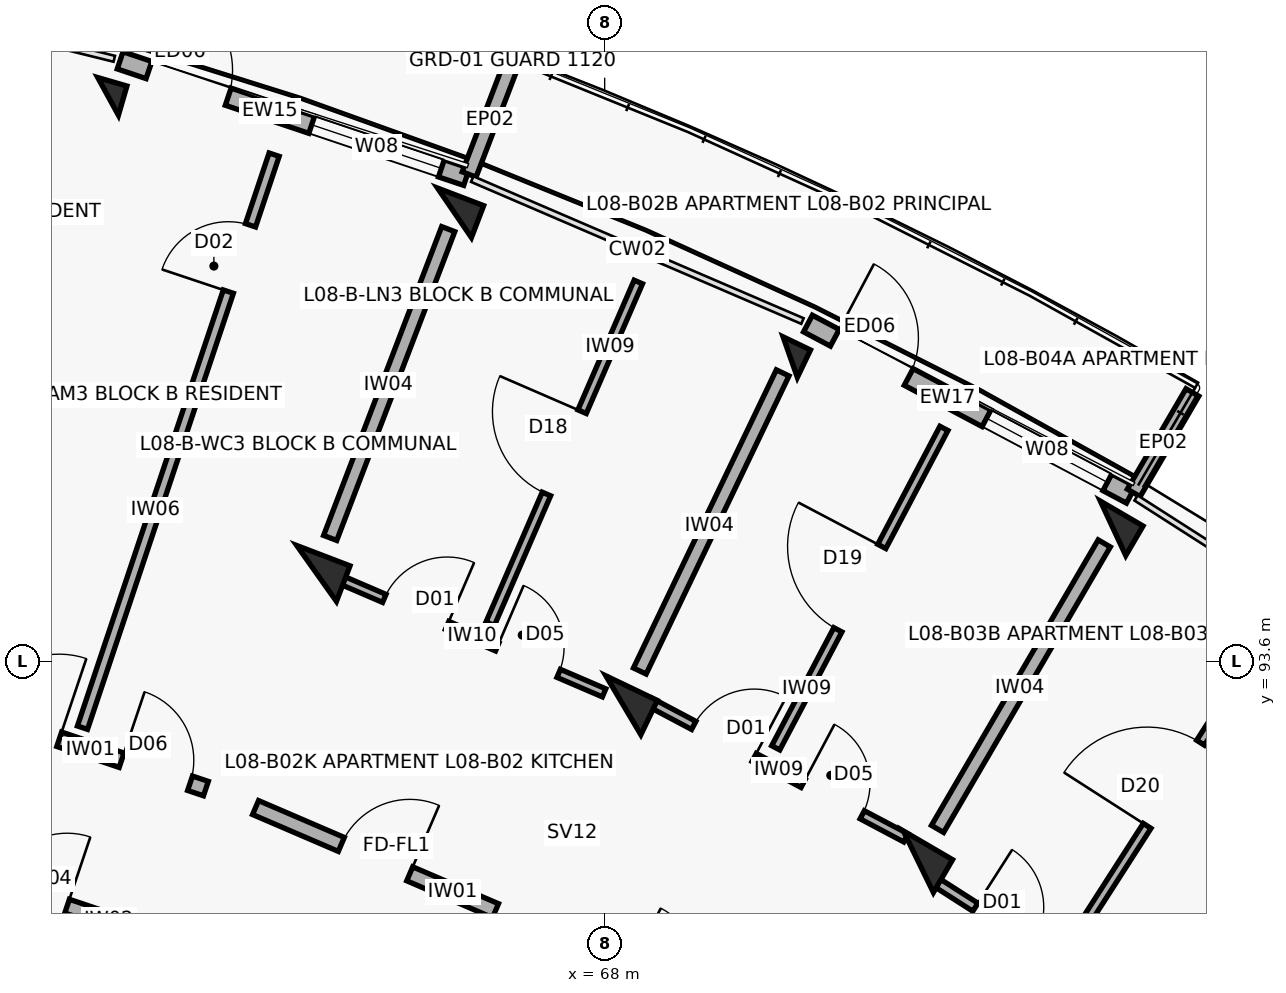
"""IFC4 building model, lengths in metres.
Left out: names, types, materials, properties, quantities, classifications, styles, units other than length and angle.
Written with IfcOpenShell. Run it as: python <this file> out.ifc"""

import sys

from ifc_helpers import new_model, si_unit, direction, frame, frame_2d, origin, origin_2d, place, context, subcontext, project, spatial, rectangle, extrude, element, fill, save


model = new_model("IFC4")
c1 = context("Model", 3, precision=1e-05, world=origin(), true_north=direction((0.0, 1.0)))
c2 = subcontext(c1, "Body", "Model", "MODEL_VIEW")
j1 = project(units=[si_unit("LENGTHUNIT", "METRE"), si_unit("PLANEANGLEUNIT", "RADIAN")], contexts=[c1])
p1 = place(None, origin())
s1 = spatial("IfcSite", under=j1, at=p1, CompositionType="ELEMENT")
p2 = place(p1, origin())
s2 = spatial("IfcBuilding", under=s1, at=p2, CompositionType="ELEMENT")
p3 = place(p2, frame((0.0, 0.0, 26.7)))
s3 = spatial("IfcBuildingStorey", under=s2, at=p3, CompositionType="ELEMENT", Elevation=26.7)
p4 = place(p3, frame((61.467, 101.031, 0.0), z_axis=(0.0, 0.0, 1.0), x_axis=(0.27966144946, 0.96009867914, 0.0)))
e1 = element("IfcColumn", 1, at=p4, inside=s3, PredefinedType="COLUMN", context=c2, shape_type="SweptSolid", body=[
    extrude(rectangle(XDim=0.4, YDim=0.4, at=origin_2d()), origin(), (0.0, 0.0, 1.0), 3.1),
])
p5 = place(p3, frame((64.21, 94.753, 0.0), z_axis=(0.0, 0.0, 1.0), x_axis=(0.357064076459, 0.934079892355, 0.0)))
e2 = element("IfcColumn", 2, at=p5, inside=s3, PredefinedType="COLUMN", context=c2, shape_type="SweptSolid", body=[
    extrude(rectangle(XDim=0.5, YDim=0.75, at=origin_2d()), origin(), (0.0, 0.0, 1.0), 3.1),
])
p6 = place(p3, frame((66.024, 99.499, 0.0), z_axis=(0.0, 0.0, 1.0), x_axis=(0.357064076459, 0.934079892355, 0.0)))
e3 = element("IfcColumn", 3, at=p6, inside=s3, PredefinedType="COLUMN", context=c2, shape_type="SweptSolid", body=[
    extrude(rectangle(XDim=0.45, YDim=0.65, at=origin_2d()), origin(), (0.0, 0.0, 1.0), 3.1),
])
p7 = place(p3, frame((68.246, 93.019, 0.0), z_axis=(0.0, 0.0, 1.0), x_axis=(0.432085748802, 0.901832526405, 0.0)))
e4 = element("IfcColumn", 4, at=p7, inside=s3, PredefinedType="COLUMN", context=c2, shape_type="SweptSolid", body=[
    extrude(rectangle(XDim=0.5, YDim=0.75, at=origin_2d()), origin(), (0.0, 0.0, 1.0), 3.1),
])
p8 = place(p3, frame((70.441, 97.6, 0.0), z_axis=(0.0, 0.0, 1.0), x_axis=(0.432085748802, 0.901832526405, 0.0)))
e5 = element("IfcColumn", 5, at=p8, inside=s3, PredefinedType="COLUMN", context=c2, shape_type="SweptSolid", body=[
    extrude(rectangle(XDim=0.4, YDim=0.4, at=origin_2d()), origin(), (0.0, 0.0, 1.0), 3.1),
])
p9 = place(p3, frame((72.127, 90.96, 0.0), z_axis=(0.0, 0.0, 1.0), x_axis=(0.504226211181, 0.863571611366, 0.0)))
e6 = element("IfcColumn", 6, at=p9, inside=s3, PredefinedType="COLUMN", context=c2, shape_type="SweptSolid", body=[
    extrude(rectangle(XDim=0.5, YDim=0.75, at=origin_2d()), origin(), (0.0, 0.0, 1.0), 3.1),
])
p10 = place(p3, frame((74.689, 95.347, 0.0), z_axis=(0.0, 0.0, 1.0), x_axis=(0.504226211181, 0.863571611366, 0.0)))
e7 = element("IfcColumn", 7, at=p10, inside=s3, PredefinedType="COLUMN", context=c2, shape_type="SweptSolid", body=[
    extrude(rectangle(XDim=0.45, YDim=0.65, at=origin_2d()), origin(), (0.0, 0.0, 1.0), 3.1),
])
p11 = place(p3, frame((61.625, 101.504, 0.0), z_axis=(0.0, 0.0, 1.0), x_axis=(0.947867898788, -0.318663531717, 0.0)))
e8 = element("IfcWall", 8, at=p11, inside=s3, PredefinedType="SOLIDWALL", context=c2, shape_type="SweptSolid", body=[
    extrude(rectangle(XDim=4.809, YDim=0.238, at=frame_2d((2.405, 0.0))), origin(), (0.0, 0.0, 1.0), 2.25),
])
p12 = place(p11, frame((0.4, 0.0, 0.0)))
e9 = element("IfcOpeningElement", 9, at=p12, cuts=e8, PredefinedType="OPENING", context=c2, shape_type="SweptSolid", body=[
    extrude(rectangle(XDim=1.1, YDim=2.15, at=frame_2d((0.55, 1.075))), frame((0.0, 0.129, 0.0), z_axis=(0.0, -1.0, 0.0), x_axis=(1.0, 0.0, 0.0)), (0.0, 0.0, 1.0), 0.258),
])
p13 = place(p11, frame((2.659, 0.0, 0.35)))
e10 = element("IfcOpeningElement", 10, at=p13, cuts=e8, PredefinedType="OPENING", context=c2, shape_type="SweptSolid", body=[
    extrude(rectangle(XDim=1.8, YDim=1.65, at=frame_2d((0.9, 0.825))), frame((0.0, 0.129, 0.0), z_axis=(0.0, -1.0, 0.0), x_axis=(1.0, 0.0, 0.0)), (0.0, 0.0, 1.0), 0.258),
])
p14 = place(p3, frame((66.217, 100.003, 0.0), z_axis=(0.0, 0.0, 1.0), x_axis=(0.356957296461, 0.934120703391, 0.0)))
e11 = element("IfcWall", 11, at=p14, inside=s3, PredefinedType="PARAPET", context=c2, shape_type="SweptSolid", body=[
    extrude(rectangle(XDim=1.53, YDim=0.195, at=frame_2d((0.765, 0.0))), origin(), (0.0, 0.0, 1.0), 2.25),
])
p15 = place(p3, frame((70.675, 98.042, 0.0), z_axis=(0.0, 0.0, 1.0), x_axis=(0.883448093208, -0.468529045639, 0.0)))
e12 = element("IfcWall", 12, at=p15, inside=s3, PredefinedType="SOLIDWALL", context=c2, shape_type="SweptSolid", body=[
    extrude(rectangle(XDim=4.809, YDim=0.248, at=frame_2d((2.405, 0.0))), origin(), (0.0, 0.0, 1.0), 2.25),
])
p16 = place(p15, frame((0.4, 0.0, 0.0)))
e13 = element("IfcOpeningElement", 13, at=p16, cuts=e12, PredefinedType="OPENING", context=c2, shape_type="SweptSolid", body=[
    extrude(rectangle(XDim=1.1, YDim=2.15, at=frame_2d((0.55, 1.075))), frame((0.0, 0.134, 0.0), z_axis=(0.0, -1.0, 0.0), x_axis=(1.0, 0.0, 0.0)), (0.0, 0.0, 1.0), 0.268),
])
p17 = place(p15, frame((2.659, 0.0, 0.35)))
e14 = element("IfcOpeningElement", 14, at=p17, cuts=e12, PredefinedType="OPENING", context=c2, shape_type="SweptSolid", body=[
    extrude(rectangle(XDim=1.8, YDim=1.65, at=frame_2d((0.9, 0.825))), frame((0.0, 0.134, 0.0), z_axis=(0.0, -1.0, 0.0), x_axis=(1.0, 0.0, 0.0)), (0.0, 0.0, 1.0), 0.268),
])
p18 = place(p3, frame((74.961, 95.813, 0.0), z_axis=(0.0, 0.0, 1.0), x_axis=(0.504228145431, 0.863570481985, 0.0)))
e15 = element("IfcWall", 15, at=p18, inside=s3, PredefinedType="PARAPET", context=c2, shape_type="SweptSolid", body=[
    extrude(rectangle(XDim=1.53, YDim=0.195, at=frame_2d((0.765, 0.0))), origin(), (0.0, 0.0, 1.0), 2.25),
])
p19 = place(p3, frame((59.497, 93.018, 0.0), z_axis=(0.0, 0.0, 1.0), x_axis=(0.947863007629, -0.318678080151, 0.0)))
e16 = element("IfcWall", 16, at=p19, inside=s3, PredefinedType="SOLIDWALL", context=c2, shape_type="SweptSolid", body=[
    extrude(rectangle(XDim=3.436, YDim=0.2, at=frame_2d((1.718, 0.0))), origin(), (0.0, 0.0, 1.0), 2.08),
])
p20 = place(p19, frame((0.28, 0.0, 0.0)))
e17 = element("IfcOpeningElement", 17, at=p20, cuts=e16, PredefinedType="OPENING", context=c2, shape_type="SweptSolid", body=[
    extrude(rectangle(XDim=1.12, YDim=2.15, at=frame_2d((0.56, 1.075))), frame((0.0, 0.11, 0.0), z_axis=(0.0, -1.0, 0.0), x_axis=(1.0, 0.0, 0.0)), (0.0, 0.0, 1.0), 0.22),
])
p21 = place(p19, frame((2.266, 0.0, 0.0)))
e18 = element("IfcOpeningElement", 18, at=p21, cuts=e16, PredefinedType="OPENING", context=c2, shape_type="SweptSolid", body=[
    extrude(rectangle(XDim=0.95, YDim=2.1, at=frame_2d((0.475, 1.05))), frame((0.0, 0.11, 0.0), z_axis=(0.0, -1.0, 0.0), x_axis=(1.0, 0.0, 0.0)), (0.0, 0.0, 1.0), 0.22),
])
p22 = place(p3, frame((58.923, 91.049, 0.0), z_axis=(0.0, 0.0, 1.0), x_axis=(0.94787351033, -0.318646839643, 0.0)))
e19 = element("IfcWall", 19, at=p22, inside=s3, PredefinedType="SOLIDWALL", context=c2, shape_type="SweptSolid", body=[
    extrude(rectangle(XDim=3.269, YDim=0.19, at=frame_2d((1.634, 0.0))), origin(), (0.0, 0.0, 1.0), 2.08),
])
p23 = place(p22, frame((1.154, 0.0, 0.0)))
e20 = element("IfcOpeningElement", 20, at=p23, cuts=e19, PredefinedType="OPENING", context=c2, shape_type="SweptSolid", body=[
    extrude(rectangle(XDim=0.96, YDim=2.1, at=frame_2d((0.48, 1.05))), frame((0.0, 0.105, 0.0), z_axis=(0.0, -1.0, 0.0), x_axis=(1.0, 0.0, 0.0)), (0.0, 0.0, 1.0), 0.21),
])
p24 = place(p3, frame((61.13, 92.724, 0.0), z_axis=(0.0, 0.0, 1.0), x_axis=(0.317204178278, 0.948357268798, 0.0)))
e21 = element("IfcWall", 21, at=p24, inside=s3, PredefinedType="PARTITIONING", context=c2, shape_type="SweptSolid", body=[
    extrude(rectangle(XDim=7.95, YDim=0.14, at=frame_2d((3.975, 0.0))), origin(), (0.0, 0.0, 1.0), 2.08),
])
p25 = place(p24, frame((6.05, 0.0, 0.0)))
e22 = element("IfcOpeningElement", 22, at=p25, cuts=e21, PredefinedType="OPENING", context=c2, shape_type="SweptSolid", body=[
    extrude(rectangle(XDim=0.92, YDim=2.1, at=frame_2d((0.46, 1.05))), frame((0.0, 0.08, 0.0), z_axis=(0.0, -1.0, 0.0), x_axis=(1.0, 0.0, 0.0)), (0.0, 0.0, 1.0), 0.16),
])
p26 = place(p3, frame((63.407, 91.673, 0.0), z_axis=(0.0, 0.0, 1.0), x_axis=(0.918718172399, -0.394913813008, 0.0)))
e23 = element("IfcWall", 23, at=p26, inside=s3, PredefinedType="SOLIDWALL", context=c2, shape_type="SweptSolid", body=[
    extrude(rectangle(XDim=3.436, YDim=0.2, at=frame_2d((1.718, 0.0))), origin(), (0.0, 0.0, 1.0), 2.08),
])
p27 = place(p26, frame((1.228, 0.0, 0.0)))
e24 = element("IfcOpeningElement", 24, at=p27, cuts=e23, PredefinedType="OPENING", context=c2, shape_type="SweptSolid", body=[
    extrude(rectangle(XDim=0.98, YDim=2.15, at=frame_2d((0.49, 1.075))), frame((0.0, 0.11, 0.0), z_axis=(0.0, -1.0, 0.0), x_axis=(1.0, 0.0, 0.0)), (0.0, 0.0, 1.0), 0.22),
])
p28 = place(p3, frame((64.503, 94.682, 0.0), z_axis=(0.0, 0.0, 1.0), x_axis=(0.918732171064, -0.394881245253, 0.0)))
e25 = element("IfcWall", 25, at=p28, inside=s3, PredefinedType="PARTITIONING", context=c2, shape_type="SweptSolid", body=[
    extrude(rectangle(XDim=3.797, YDim=0.115, at=frame_2d((1.899, 0.0))), origin(), (0.0, 0.0, 1.0), 2.08),
])
p29 = place(p28, frame((0.65, 0.0, 0.0)))
e26 = element("IfcOpeningElement", 26, at=p29, cuts=e25, PredefinedType="OPENING", context=c2, shape_type="SweptSolid", body=[
    extrude(rectangle(XDim=0.9, YDim=2.1, at=frame_2d((0.45, 1.05))), frame((0.0, 0.067, 0.0), z_axis=(0.0, -1.0, 0.0), x_axis=(1.0, 0.0, 0.0)), (0.0, 0.0, 1.0), 0.135),
])
p30 = place(p28, frame((2.267, 0.0, 0.0)))
e27 = element("IfcOpeningElement", 27, at=p30, cuts=e25, PredefinedType="OPENING", context=c2, shape_type="SweptSolid", body=[
    extrude(rectangle(XDim=0.88, YDim=2.1, at=frame_2d((0.44, 1.05))), frame((0.0, 0.067, 0.0), z_axis=(0.0, -1.0, 0.0), x_axis=(1.0, 0.0, 0.0)), (0.0, 0.0, 1.0), 0.135),
])
p31 = place(p3, frame((66.494, 94.092, 0.0), z_axis=(0.0, 0.0, 1.0), x_axis=(0.397698322092, 0.917516236698, 0.0)))
e28 = element("IfcWall", 28, at=p31, inside=s3, PredefinedType="PARTITIONING", context=c2, shape_type="SweptSolid", body=[
    extrude(rectangle(XDim=4.9, YDim=0.12, at=frame_2d((2.45, 0.0))), origin(), (0.0, 0.0, 1.0), 2.08),
])
p32 = place(p31, frame((1.86, 0.0, 0.0)))
e29 = element("IfcOpeningElement", 29, at=p32, cuts=e28, PredefinedType="OPENING", context=c2, shape_type="SweptSolid", body=[
    extrude(rectangle(XDim=1.18, YDim=2.1, at=frame_2d((0.59, 1.05))), frame((0.0, 0.07, 0.0), z_axis=(0.0, -1.0, 0.0), x_axis=(1.0, 0.0, 0.0)), (0.0, 0.0, 1.0), 0.14),
])
p33 = place(p3, frame((64.389, 95.22, 0.0), z_axis=(0.0, 0.0, 1.0), x_axis=(0.357064016205, 0.934079915388, 0.0)))
e30 = element("IfcWall", 30, at=p33, inside=s3, PredefinedType="SOLIDWALL", context=c2, shape_type="SweptSolid", body=[
    extrude(rectangle(XDim=4.35, YDim=0.185, at=frame_2d((2.175, 0.0))), origin(), (0.0, 0.0, 1.0), 2.08),
])
p34 = place(p3, frame((68.598, 93.058, 0.0), z_axis=(0.0, 0.0, 1.0), x_axis=(0.883441603894, -0.468541281543, 0.0)))
e31 = element("IfcWall", 31, at=p34, inside=s3, PredefinedType="PARTITIONING", context=c2, shape_type="SweptSolid", body=[
    extrude(rectangle(XDim=3.81, YDim=0.12, at=frame_2d((1.905, 0.0))), origin(), (0.0, 0.0, 1.0), 2.08),
])
p35 = place(p34, frame((0.65, 0.0, 0.0)))
e32 = element("IfcOpeningElement", 32, at=p35, cuts=e31, PredefinedType="OPENING", context=c2, shape_type="SweptSolid", body=[
    extrude(rectangle(XDim=0.9, YDim=2.1, at=frame_2d((0.45, 1.05))), frame((0.0, 0.07, 0.0), z_axis=(0.0, -1.0, 0.0), x_axis=(1.0, 0.0, 0.0)), (0.0, 0.0, 1.0), 0.14),
])
p36 = place(p34, frame((2.28, 0.0, 0.0)))
e33 = element("IfcOpeningElement", 33, at=p36, cuts=e31, PredefinedType="OPENING", context=c2, shape_type="SweptSolid", body=[
    extrude(rectangle(XDim=0.88, YDim=2.1, at=frame_2d((0.44, 1.05))), frame((0.0, 0.07, 0.0), z_axis=(0.0, -1.0, 0.0), x_axis=(1.0, 0.0, 0.0)), (0.0, 0.0, 1.0), 0.14),
])
p37 = place(p3, frame((70.251, 92.459, 0.0), z_axis=(0.0, 0.0, 1.0), x_axis=(0.465865054936, 0.884855779542, 0.0)))
e34 = element("IfcWall", 34, at=p37, inside=s3, PredefinedType="PARTITIONING", context=c2, shape_type="SweptSolid", body=[
    extrude(rectangle(XDim=4.75, YDim=0.12, at=frame_2d((2.375, 0.0))), origin(), (0.0, 0.0, 1.0), 2.08),
])
p38 = place(p37, frame((1.755, 0.0, 0.0)))
e35 = element("IfcOpeningElement", 35, at=p38, cuts=e34, PredefinedType="OPENING", context=c2, shape_type="SweptSolid", body=[
    extrude(rectangle(XDim=1.24, YDim=2.1, at=frame_2d((0.62, 1.05))), frame((0.0, 0.07, 0.0), z_axis=(0.0, -1.0, 0.0), x_axis=(1.0, 0.0, 0.0)), (0.0, 0.0, 1.0), 0.14),
])
p39 = place(p3, frame((68.462, 93.469, 0.0), z_axis=(0.0, 0.0, 1.0), x_axis=(0.432086898897, 0.901831975371, 0.0)))
e36 = element("IfcWall", 36, at=p39, inside=s3, PredefinedType="SOLIDWALL", context=c2, shape_type="SweptSolid", body=[
    extrude(rectangle(XDim=4.35, YDim=0.185, at=frame_2d((2.175, 0.0))), origin(), (0.0, 0.0, 1.0), 2.08),
])
p40 = place(p3, frame((72.33, 90.712, 0.0), z_axis=(0.0, 0.0, 1.0), x_axis=(0.842245628842, -0.539093962771, 0.0)))
e37 = element("IfcWall", 37, at=p40, inside=s3, PredefinedType="PARTITIONING", context=c2, shape_type="SweptSolid", body=[
    extrude(rectangle(XDim=3.785, YDim=0.125, at=frame_2d((1.893, 0.0))), origin(), (0.0, 0.0, 1.0), 2.08),
])
p41 = place(p40, frame((0.65, 0.0, 0.0)))
e38 = element("IfcOpeningElement", 38, at=p41, cuts=e37, PredefinedType="OPENING", context=c2, shape_type="SweptSolid", body=[
    extrude(rectangle(XDim=0.9, YDim=2.1, at=frame_2d((0.45, 1.05))), frame((0.0, 0.073, 0.0), z_axis=(0.0, -1.0, 0.0), x_axis=(1.0, 0.0, 0.0)), (0.0, 0.0, 1.0), 0.145),
])
p42 = place(p40, frame((2.255, 0.0, 0.0)))
e39 = element("IfcOpeningElement", 39, at=p42, cuts=e37, PredefinedType="OPENING", context=c2, shape_type="SweptSolid", body=[
    extrude(rectangle(XDim=0.88, YDim=2.1, at=frame_2d((0.44, 1.05))), frame((0.0, 0.073, 0.0), z_axis=(0.0, -1.0, 0.0), x_axis=(1.0, 0.0, 0.0)), (0.0, 0.0, 1.0), 0.145),
])
p43 = place(p3, frame((74.124, 89.854, 0.0), z_axis=(0.0, 0.0, 1.0), x_axis=(0.5403494769, 0.84144069477, 0.0)))
e40 = element("IfcWall", 40, at=p43, inside=s3, PredefinedType="PARTITIONING", context=c2, shape_type="SweptSolid", body=[
    extrude(rectangle(XDim=5.05, YDim=0.12, at=frame_2d((2.525, 0.0))), origin(), (0.0, 0.0, 1.0), 2.08),
])
p44 = place(p43, frame((1.875, 0.0, 0.0)))
e41 = element("IfcOpeningElement", 41, at=p44, cuts=e40, PredefinedType="OPENING", context=c2, shape_type="SweptSolid", body=[
    extrude(rectangle(XDim=1.3, YDim=2.1, at=frame_2d((0.65, 1.05))), frame((0.0, 0.07, 0.0), z_axis=(0.0, -1.0, 0.0), x_axis=(1.0, 0.0, 0.0)), (0.0, 0.0, 1.0), 0.14),
])
p45 = place(p3, frame((72.379, 91.392, 0.0), z_axis=(0.0, 0.0, 1.0), x_axis=(0.504216452091, 0.863577309475, 0.0)))
e42 = element("IfcWall", 42, at=p45, inside=s3, PredefinedType="SOLIDWALL", context=c2, shape_type="SweptSolid", body=[
    extrude(rectangle(XDim=4.35, YDim=0.185, at=frame_2d((2.175, 0.0))), origin(), (0.0, 0.0, 1.0), 2.08),
])
p46 = place(p12, origin())
e43 = element("IfcDoor", 43, at=p46, inside=s3, OperationType="SINGLE_SWING_LEFT", PredefinedType="DOOR", context=c2, shape_type="SweptSolid", body=[
    extrude(rectangle(XDim=1.1, YDim=2.15, at=frame_2d((0.55, 1.075))), frame((0.0, 0.025, 0.0), z_axis=(0.0, -1.0, 0.0), x_axis=(1.0, 0.0, 0.0)), (0.0, 0.0, 1.0), 0.05),
])
fill(e9, e43)
p47 = place(p13, origin())
e44 = element("IfcWindow", 44, at=p47, inside=s3, PartitioningType="TRIPLE_PANEL_VERTICAL", PredefinedType="WINDOW", context=c2, shape_type="SweptSolid", body=[
    extrude(rectangle(XDim=1.8, YDim=1.65, at=frame_2d((0.9, 0.825))), frame((0.0, 0.03, 0.0), z_axis=(0.0, -1.0, 0.0), x_axis=(1.0, 0.0, 0.0)), (0.0, 0.0, 1.0), 0.06),
])
fill(e10, e44)
p48 = place(p16, origin())
e45 = element("IfcDoor", 45, at=p48, inside=s3, OperationType="SINGLE_SWING_LEFT", PredefinedType="DOOR", context=c2, shape_type="SweptSolid", body=[
    extrude(rectangle(XDim=1.1, YDim=2.15, at=frame_2d((0.55, 1.075))), frame((0.0, 0.025, 0.0), z_axis=(0.0, -1.0, 0.0), x_axis=(1.0, 0.0, 0.0)), (0.0, 0.0, 1.0), 0.05),
])
fill(e13, e45)
p49 = place(p17, origin())
e46 = element("IfcWindow", 46, at=p49, inside=s3, PartitioningType="TRIPLE_PANEL_VERTICAL", PredefinedType="WINDOW", context=c2, shape_type="SweptSolid", body=[
    extrude(rectangle(XDim=1.8, YDim=1.65, at=frame_2d((0.9, 0.825))), frame((0.0, 0.03, 0.0), z_axis=(0.0, -1.0, 0.0), x_axis=(1.0, 0.0, 0.0)), (0.0, 0.0, 1.0), 0.06),
])
fill(e14, e46)
p50 = place(p20, origin())
e47 = element("IfcDoor", 47, at=p50, inside=s3, OperationType="SINGLE_SWING_RIGHT", PredefinedType="DOOR", context=c2, shape_type="SweptSolid", body=[
    extrude(rectangle(XDim=1.12, YDim=2.15, at=frame_2d((0.56, 1.075))), frame((0.0, 0.025, 0.0), z_axis=(0.0, -1.0, 0.0), x_axis=(1.0, 0.0, 0.0)), (0.0, 0.0, 1.0), 0.05),
])
fill(e17, e47)
p51 = place(p21, origin())
e48 = element("IfcDoor", 48, at=p51, inside=s3, OperationType="SINGLE_SWING_LEFT", PredefinedType="DOOR", context=c2, shape_type="SweptSolid", body=[
    extrude(rectangle(XDim=0.95, YDim=2.1, at=frame_2d((0.475, 1.05))), frame((0.0, 0.025, 0.0), z_axis=(0.0, -1.0, 0.0), x_axis=(1.0, 0.0, 0.0)), (0.0, 0.0, 1.0), 0.05),
])
fill(e18, e48)
p52 = place(p23, origin())
e49 = element("IfcDoor", 49, at=p52, inside=s3, OperationType="SINGLE_SWING_RIGHT", PredefinedType="DOOR", context=c2, shape_type="SweptSolid", body=[
    extrude(rectangle(XDim=0.96, YDim=2.1, at=frame_2d((0.48, 1.05))), frame((0.0, 0.025, 0.0), z_axis=(0.0, -1.0, 0.0), x_axis=(1.0, 0.0, 0.0)), (0.0, 0.0, 1.0), 0.05),
])
fill(e20, e49)
p53 = place(p25, origin())
e50 = element("IfcDoor", 50, at=p53, inside=s3, OperationType="SINGLE_SWING_LEFT", PredefinedType="DOOR", context=c2, shape_type="SweptSolid", body=[
    extrude(rectangle(XDim=0.92, YDim=2.1, at=frame_2d((0.46, 1.05))), frame((0.0, 0.025, 0.0), z_axis=(0.0, -1.0, 0.0), x_axis=(1.0, 0.0, 0.0)), (0.0, 0.0, 1.0), 0.05),
])
fill(e22, e50)
p54 = place(p27, origin())
e51 = element("IfcDoor", 51, at=p54, inside=s3, OperationType="SINGLE_SWING_RIGHT", PredefinedType="DOOR", context=c2, shape_type="SweptSolid", body=[
    extrude(rectangle(XDim=0.98, YDim=2.15, at=frame_2d((0.49, 1.075))), frame((0.0, 0.025, 0.0), z_axis=(0.0, -1.0, 0.0), x_axis=(1.0, 0.0, 0.0)), (0.0, 0.0, 1.0), 0.05),
])
fill(e24, e51)
p55 = place(p29, origin())
e52 = element("IfcDoor", 52, at=p55, inside=s3, OperationType="SINGLE_SWING_RIGHT", PredefinedType="DOOR", context=c2, shape_type="SweptSolid", body=[
    extrude(rectangle(XDim=0.9, YDim=2.1, at=frame_2d((0.45, 1.05))), frame((0.0, 0.025, 0.0), z_axis=(0.0, -1.0, 0.0), x_axis=(1.0, 0.0, 0.0)), (0.0, 0.0, 1.0), 0.05),
])
fill(e26, e52)
p56 = place(p30, origin())
e53 = element("IfcDoor", 53, at=p56, inside=s3, OperationType="SINGLE_SWING_LEFT", PredefinedType="DOOR", context=c2, shape_type="SweptSolid", body=[
    extrude(rectangle(XDim=0.88, YDim=2.1, at=frame_2d((0.44, 1.05))), frame((0.0, 0.025, 0.0), z_axis=(0.0, -1.0, 0.0), x_axis=(1.0, 0.0, 0.0)), (0.0, 0.0, 1.0), 0.05),
])
fill(e27, e53)
p57 = place(p32, origin())
e54 = element("IfcDoor", 54, at=p57, inside=s3, OperationType="SINGLE_SWING_RIGHT", PredefinedType="DOOR", context=c2, shape_type="SweptSolid", body=[
    extrude(rectangle(XDim=1.18, YDim=2.1, at=frame_2d((0.59, 1.05))), frame((0.0, 0.025, 0.0), z_axis=(0.0, -1.0, 0.0), x_axis=(1.0, 0.0, 0.0)), (0.0, 0.0, 1.0), 0.05),
])
fill(e29, e54)
p58 = place(p35, origin())
e55 = element("IfcDoor", 55, at=p58, inside=s3, OperationType="SINGLE_SWING_RIGHT", PredefinedType="DOOR", context=c2, shape_type="SweptSolid", body=[
    extrude(rectangle(XDim=0.9, YDim=2.1, at=frame_2d((0.45, 1.05))), frame((0.0, 0.025, 0.0), z_axis=(0.0, -1.0, 0.0), x_axis=(1.0, 0.0, 0.0)), (0.0, 0.0, 1.0), 0.05),
])
fill(e32, e55)
p59 = place(p36, origin())
e56 = element("IfcDoor", 56, at=p59, inside=s3, OperationType="SINGLE_SWING_LEFT", PredefinedType="DOOR", context=c2, shape_type="SweptSolid", body=[
    extrude(rectangle(XDim=0.88, YDim=2.1, at=frame_2d((0.44, 1.05))), frame((0.0, 0.025, 0.0), z_axis=(0.0, -1.0, 0.0), x_axis=(1.0, 0.0, 0.0)), (0.0, 0.0, 1.0), 0.05),
])
fill(e33, e56)
p60 = place(p38, origin())
e57 = element("IfcDoor", 57, at=p60, inside=s3, OperationType="SINGLE_SWING_RIGHT", PredefinedType="DOOR", context=c2, shape_type="SweptSolid", body=[
    extrude(rectangle(XDim=1.24, YDim=2.1, at=frame_2d((0.62, 1.05))), frame((0.0, 0.025, 0.0), z_axis=(0.0, -1.0, 0.0), x_axis=(1.0, 0.0, 0.0)), (0.0, 0.0, 1.0), 0.05),
])
fill(e35, e57)
p61 = place(p41, origin())
e58 = element("IfcDoor", 58, at=p61, inside=s3, OperationType="SINGLE_SWING_LEFT", PredefinedType="DOOR", context=c2, shape_type="SweptSolid", body=[
    extrude(rectangle(XDim=0.9, YDim=2.1, at=frame_2d((0.45, 1.05))), frame((0.0, 0.025, 0.0), z_axis=(0.0, -1.0, 0.0), x_axis=(1.0, 0.0, 0.0)), (0.0, 0.0, 1.0), 0.05),
])
fill(e38, e58)
p62 = place(p44, origin())
e59 = element("IfcDoor", 59, at=p62, inside=s3, OperationType="SINGLE_SWING_LEFT", PredefinedType="DOOR", context=c2, shape_type="SweptSolid", body=[
    extrude(rectangle(XDim=1.3, YDim=2.1, at=frame_2d((0.65, 1.05))), frame((0.0, 0.025, 0.0), z_axis=(0.0, -1.0, 0.0), x_axis=(1.0, 0.0, 0.0)), (0.0, 0.0, 1.0), 0.05),
])
fill(e41, e59)
save(model, sys.argv[1])
